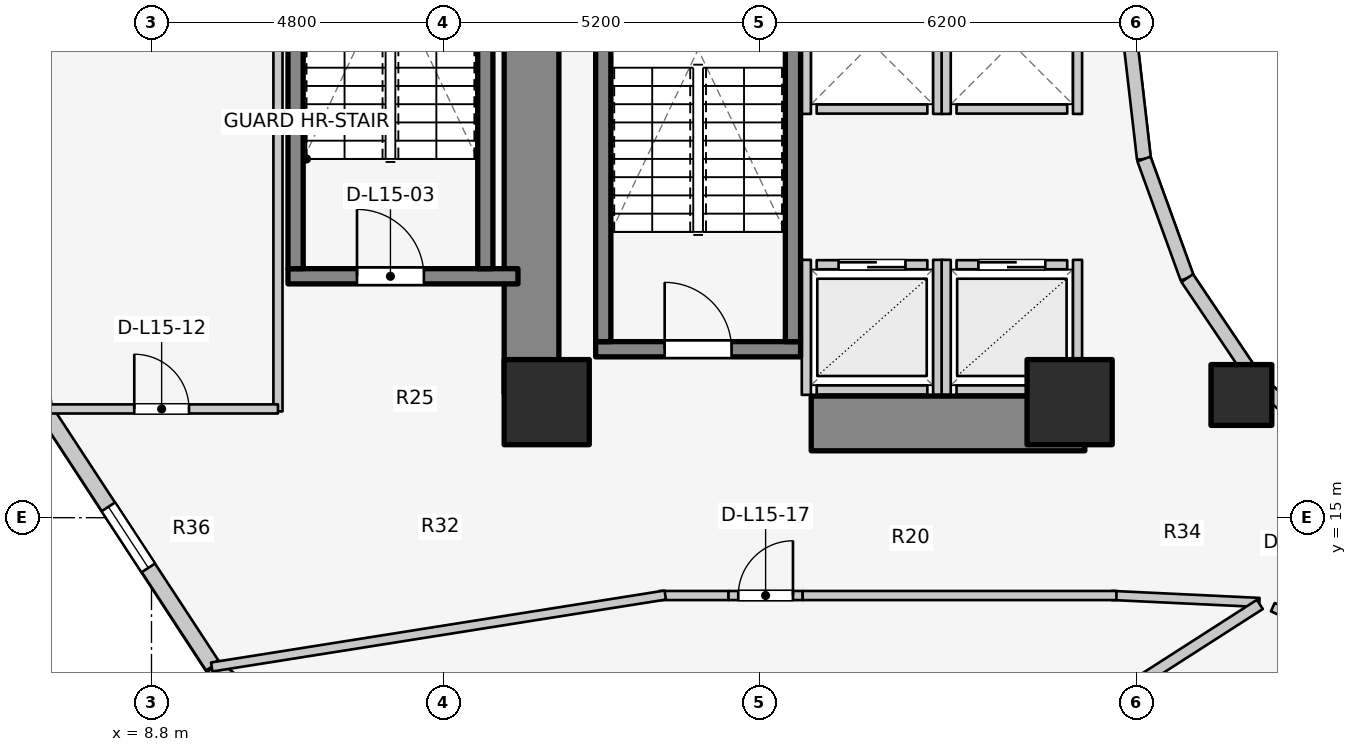
"""IFC4 building model, lengths in metres.
Left out: names, types, materials, properties, quantities, classifications, styles, units other than length and angle.
Written with IfcOpenShell. Run it as: python <this file> out.ifc"""

import sys

from ifc_helpers import new_model, si_unit, direction, frame, frame_2d, origin, origin_2d, place, context, subcontext, project, spatial, rectangle, extrude, element, fill, save


model = new_model("IFC4")
c1 = context("Model", 3, precision=1e-05, world=origin(), true_north=direction((0.0, 1.0)))
c2 = subcontext(c1, "Body", "Model", "MODEL_VIEW")
j1 = project(units=[si_unit("LENGTHUNIT", "METRE"), si_unit("PLANEANGLEUNIT", "RADIAN")], contexts=[c1])
p1 = place(None, origin())
s1 = spatial("IfcSite", under=j1, at=p1, CompositionType="ELEMENT")
p2 = place(p1, origin())
s2 = spatial("IfcBuilding", under=s1, at=p2, CompositionType="ELEMENT")
p3 = place(p2, frame((0.0, 0.0, 52.4)))
s3 = spatial("IfcBuildingStorey", under=s2, at=p3, CompositionType="ELEMENT", Elevation=52.4)
p4 = place(p3, frame((15.05, 17.05, 0.0), z_axis=(0.0, 0.0, 1.0), x_axis=(0.0, 1.0, 0.0)))
e1 = element("IfcWall", 1, at=p4, inside=s3, PredefinedType="SHEAR", context=c2, shape_type="SweptSolid", body=[
    extrude(rectangle(XDim=12.8, YDim=0.9, at=frame_2d((6.4, 0.0))), origin(), (0.0, 0.0, 1.0), 3.1),
])
p5 = place(p3, frame((19.65, 16.55, 0.0), z_axis=(0.0, 0.0, 1.0), x_axis=(1.0, 0.0, 0.0)))
e2 = element("IfcWall", 2, at=p5, inside=s3, PredefinedType="SHEAR", context=c2, shape_type="SweptSolid", body=[
    extrude(rectangle(XDim=4.5, YDim=0.9, at=frame_2d((2.25, 0.0))), origin(), (0.0, 0.0, 1.0), 3.1),
])
p6 = place(p3, frame((16.105, 17.77, 0.0), z_axis=(0.0, 0.0, 1.0), x_axis=(1.0, 0.0, 0.0)))
e3 = element("IfcWall", 3, at=p6, inside=s3, PredefinedType="SOLIDWALL", context=c2, shape_type="SweptSolid", body=[
    extrude(rectangle(XDim=3.37, YDim=0.25, at=frame_2d((1.685, 0.0))), origin(), (0.0, 0.0, 1.0), 3.1),
])
p7 = place(p6, frame((1.135, 0.0, 0.0)))
e4 = element("IfcOpeningElement", 4, at=p7, cuts=e3, PredefinedType="OPENING", context=c2, shape_type="SweptSolid", body=[
    extrude(rectangle(XDim=1.1, YDim=2.1, at=frame_2d((0.55, 1.05))), frame((0.0, 0.135, 0.0), z_axis=(0.0, -1.0, 0.0), x_axis=(1.0, 0.0, 0.0)), (0.0, 0.0, 1.0), 0.27),
])
for number, where, z_axis, x_axis in (
    (5, (16.23, 17.895, 0.0), (0.0, 0.0, 1.0), (0.0, 1.0, 0.0)),
    (6, (19.35, 17.895, 0.0), (0.0, 0.0, 1.0), (0.0, 1.0, 0.0)),
):
    element("IfcWall", number, at=place(p3, frame(where, z_axis=z_axis, x_axis=x_axis)), inside=s3, PredefinedType="SOLIDWALL", context=c2, shape_type="SweptSolid", body=[
        extrude(rectangle(XDim=7.81, YDim=0.25, at=frame_2d((3.905, 0.0))), origin(), (0.0, 0.0, 1.0), 3.1),
    ])
p8 = place(p3, frame((11.045, 18.97, 0.0), z_axis=(0.0, 0.0, 1.0), x_axis=(1.0, 0.0, 0.0)))
e7 = element("IfcWall", 7, at=p8, inside=s3, PredefinedType="SOLIDWALL", context=c2, shape_type="SweptSolid", body=[
    extrude(rectangle(XDim=3.782, YDim=0.25, at=frame_2d((1.891, 0.0))), origin(), (0.0, 0.0, 1.0), 3.1),
])
p9 = place(p8, frame((1.135, 0.0, 0.0)))
e8 = element("IfcOpeningElement", 8, at=p9, cuts=e7, PredefinedType="OPENING", context=c2, shape_type="SweptSolid", body=[
    extrude(rectangle(XDim=1.1, YDim=2.1, at=frame_2d((0.55, 1.05))), frame((0.0, 0.135, 0.0), z_axis=(0.0, -1.0, 0.0), x_axis=(1.0, 0.0, 0.0)), (0.0, 0.0, 1.0), 0.27),
])
for number, where, z_axis, x_axis in (
    (9, (11.17, 19.095, 0.0), (0.0, 0.0, 1.0), (0.0, 1.0, 0.0)),
    (10, (14.29, 19.095, 0.0), (0.0, 0.0, 1.0), (0.0, 1.0, 0.0)),
):
    element("IfcWall", number, at=place(p3, frame(where, z_axis=z_axis, x_axis=x_axis)), inside=s3, PredefinedType="SOLIDWALL", context=c2, shape_type="SweptSolid", body=[
        extrude(rectangle(XDim=7.81, YDim=0.25, at=frame_2d((3.905, 0.0))), origin(), (0.0, 0.0, 1.0), 3.1),
    ])
for number, where, z_axis, x_axis in (
    (11, (15.3, 16.9, 0.0), (0.0, 0.0, 1.0), (1.0, 0.0, 0.0)),
    (12, (23.9, 16.9, 0.0), (0.0, 0.0, 1.0), (1.0, 0.0, 0.0)),
):
    element("IfcColumn", number, at=place(p3, frame(where, z_axis=z_axis, x_axis=x_axis)), inside=s3, PredefinedType="COLUMN", context=c2, shape_type="SweptSolid", body=[
        extrude(rectangle(XDim=1.4, YDim=1.4, at=origin_2d()), origin(), (0.0, 0.0, 1.0), 3.1),
    ])
p10 = place(p3, frame((26.725, 17.018, 0.0), z_axis=(0.0, 0.0, 1.0), x_axis=(1.0, 0.0, 0.0)))
e13 = element("IfcColumn", 13, at=p10, inside=s3, PredefinedType="COLUMN", context=c2, shape_type="SweptSolid", body=[
    extrude(rectangle(XDim=1.0, YDim=1.0, at=origin_2d()), origin(), (0.0, 0.0, 1.0), 3.1),
])
p11 = place(p3, frame((24.88, 23.0, 0.0), z_axis=(0.0, 0.0, 1.0), x_axis=(0.114711713601, -0.993398823617, 0.0)))
e14 = element("IfcWall", 14, at=p11, inside=s3, PredefinedType="STANDARD", context=c2, shape_type="SweptSolid", body=[
    extrude(rectangle(XDim=2.115, YDim=0.23, at=frame_2d((1.058, 0.0))), origin(), (0.0, 0.0, 1.0), 2.56),
])
p12 = place(p3, frame((25.123, 20.898, 0.0), z_axis=(0.0, 0.0, 1.0), x_axis=(0.341423187295, -0.93990968033, 0.0)))
e15 = element("IfcWall", 15, at=p12, inside=s3, PredefinedType="STANDARD", context=c2, shape_type="SweptSolid", body=[
    extrude(rectangle(XDim=2.084, YDim=0.23, at=frame_2d((1.042, 0.0))), origin(), (0.0, 0.0, 1.0), 2.56),
])
p13 = place(p3, frame((25.834, 18.94, 0.0), z_axis=(0.0, 0.0, 1.0), x_axis=(0.558197800898, -0.829707909492, 0.0)))
e16 = element("IfcWall", 16, at=p13, inside=s3, PredefinedType="STANDARD", context=c2, shape_type="SweptSolid", body=[
    extrude(rectangle(XDim=2.027, YDim=0.23, at=frame_2d((1.013, 0.0))), origin(), (0.0, 0.0, 1.0), 1.22),
])
p14 = place(p3, frame((26.965, 17.258, 0.0), z_axis=(0.0, 0.0, 1.0), x_axis=(0.752576694707, -0.658504607869, 0.0)))
e17 = element("IfcWall", 17, at=p14, inside=s3, PredefinedType="STANDARD", context=c2, shape_type="SweptSolid", body=[
    extrude(rectangle(XDim=1.959, YDim=0.23, at=frame_2d((0.98, 0.0))), origin(), (0.0, 0.0, 1.0), 1.22),
])
p15 = place(p3, frame((7.033, 16.795, 0.0), z_axis=(0.0, 0.0, 1.0), x_axis=(0.547702757047, -0.836672988642, 0.0)))
e18 = element("IfcWall", 18, at=p15, inside=s3, PredefinedType="STANDARD", context=c2, shape_type="SweptSolid", body=[
    extrude(rectangle(XDim=5.062, YDim=0.26, at=frame_2d((2.531, 0.0))), origin(), (0.0, 0.0, 1.0), 1.22),
])
p16 = place(p15, frame((1.931, 0.0, 0.15)))
e19 = element("IfcOpeningElement", 19, at=p16, cuts=e18, PredefinedType="OPENING", context=c2, shape_type="SweptSolid", body=[
    extrude(rectangle(XDim=1.2, YDim=0.9, at=frame_2d((0.6, 0.45))), frame((0.0, 0.14, 0.0), z_axis=(0.0, -1.0, 0.0), x_axis=(1.0, 0.0, 0.0)), (0.0, 0.0, 1.0), 0.28),
])
p17 = place(p3, frame((9.806, 12.559, 0.0), z_axis=(0.0, 0.0, 1.0), x_axis=(0.783123133379, -0.621866672179, 0.0)))
e20 = element("IfcWall", 20, at=p17, inside=s3, PredefinedType="STANDARD", context=c2, shape_type="SweptSolid", body=[
    extrude(rectangle(XDim=4.839, YDim=0.26, at=frame_2d((2.419, 0.0))), origin(), (0.0, 0.0, 1.0), 1.22),
])
p18 = place(p17, frame((1.819, 0.0, 0.15)))
e21 = element("IfcOpeningElement", 21, at=p18, cuts=e20, PredefinedType="OPENING", context=c2, shape_type="SweptSolid", body=[
    extrude(rectangle(XDim=1.2, YDim=0.9, at=frame_2d((0.6, 0.45))), frame((0.0, 0.14, 0.0), z_axis=(0.0, -1.0, 0.0), x_axis=(1.0, 0.0, 0.0)), (0.0, 0.0, 1.0), 0.28),
])
p19 = place(p3, frame((19.74, 19.16, 0.0), z_axis=(0.0, 0.0, 1.0), x_axis=(1.0, 0.0, 0.0)))
e22 = element("IfcWall", 22, at=p19, inside=s3, PredefinedType="SOLIDWALL", context=c2, shape_type="SweptSolid", body=[
    extrude(rectangle(XDim=1.82, YDim=0.15, at=frame_2d((0.91, 0.0))), origin(), (0.0, 0.0, 1.0), 2.575),
])
p20 = place(p19, frame((0.36, 0.0, 0.0)))
e23 = element("IfcOpeningElement", 23, at=p20, cuts=e22, PredefinedType="OPENING", context=c2, shape_type="SweptSolid", body=[
    extrude(rectangle(XDim=1.1, YDim=2.1, at=frame_2d((0.55, 1.05))), frame((0.0, 0.085, 0.0), z_axis=(0.0, -1.0, 0.0), x_axis=(1.0, 0.0, 0.0)), (0.0, 0.0, 1.0), 0.17),
])
p21 = place(p3, frame((19.74, 17.1, 0.0), z_axis=(0.0, 0.0, 1.0), x_axis=(1.0, 0.0, 0.0)))
e24 = element("IfcWall", 24, at=p21, inside=s3, PredefinedType="SOLIDWALL", context=c2, shape_type="SweptSolid", body=[
    extrude(rectangle(XDim=1.82, YDim=0.15, at=frame_2d((0.91, 0.0))), origin(), (0.0, 0.0, 1.0), 2.575),
])
p22 = place(p3, frame((19.57, 17.02, 0.0), z_axis=(0.0, 0.0, 1.0), x_axis=(0.0, 1.0, 0.0)))
e25 = element("IfcWall", 25, at=p22, inside=s3, PredefinedType="SOLIDWALL", context=c2, shape_type="SweptSolid", body=[
    extrude(rectangle(XDim=2.22, YDim=0.15, at=frame_2d((1.11, 0.0))), origin(), (0.0, 0.0, 1.0), 2.12),
])
p23 = place(p3, frame((21.73, 17.02, 0.0), z_axis=(0.0, 0.0, 1.0), x_axis=(0.0, 1.0, 0.0)))
e26 = element("IfcWall", 26, at=p23, inside=s3, PredefinedType="SOLIDWALL", context=c2, shape_type="SweptSolid", body=[
    extrude(rectangle(XDim=2.22, YDim=0.15, at=frame_2d((1.11, 0.0))), origin(), (0.0, 0.0, 1.0), 2.575),
])
p24 = place(p3, frame((22.04, 19.16, 0.0), z_axis=(0.0, 0.0, 1.0), x_axis=(1.0, 0.0, 0.0)))
e27 = element("IfcWall", 27, at=p24, inside=s3, PredefinedType="SOLIDWALL", context=c2, shape_type="SweptSolid", body=[
    extrude(rectangle(XDim=1.82, YDim=0.15, at=frame_2d((0.91, 0.0))), origin(), (0.0, 0.0, 1.0), 2.12),
])
p25 = place(p24, frame((0.36, 0.0, 0.0)))
e28 = element("IfcOpeningElement", 28, at=p25, cuts=e27, PredefinedType="OPENING", context=c2, shape_type="SweptSolid", body=[
    extrude(rectangle(XDim=1.1, YDim=2.1, at=frame_2d((0.55, 1.05))), frame((0.0, 0.085, 0.0), z_axis=(0.0, -1.0, 0.0), x_axis=(1.0, 0.0, 0.0)), (0.0, 0.0, 1.0), 0.17),
])
p26 = place(p3, frame((22.04, 17.1, 0.0), z_axis=(0.0, 0.0, 1.0), x_axis=(1.0, 0.0, 0.0)))
e29 = element("IfcWall", 29, at=p26, inside=s3, PredefinedType="SOLIDWALL", context=c2, shape_type="SweptSolid", body=[
    extrude(rectangle(XDim=1.82, YDim=0.15, at=frame_2d((0.91, 0.0))), origin(), (0.0, 0.0, 1.0), 2.12),
])
p27 = place(p3, frame((21.87, 17.02, 0.0), z_axis=(0.0, 0.0, 1.0), x_axis=(0.0, 1.0, 0.0)))
e30 = element("IfcWall", 30, at=p27, inside=s3, PredefinedType="SOLIDWALL", context=c2, shape_type="SweptSolid", body=[
    extrude(rectangle(XDim=2.22, YDim=0.15, at=frame_2d((1.11, 0.0))), origin(), (0.0, 0.0, 1.0), 2.575),
])
p28 = place(p3, frame((24.03, 17.02, 0.0), z_axis=(0.0, 0.0, 1.0), x_axis=(0.0, 1.0, 0.0)))
e31 = element("IfcWall", 31, at=p28, inside=s3, PredefinedType="SOLIDWALL", context=c2, shape_type="SweptSolid", body=[
    extrude(rectangle(XDim=2.22, YDim=0.15, at=frame_2d((1.11, 0.0))), origin(), (0.0, 0.0, 1.0), 1.873),
])
p29 = place(p3, frame((19.74, 21.72, 0.0), z_axis=(0.0, 0.0, 1.0), x_axis=(1.0, 0.0, 0.0)))
e32 = element("IfcWall", 32, at=p29, inside=s3, PredefinedType="SOLIDWALL", context=c2, shape_type="SweptSolid", body=[
    extrude(rectangle(XDim=1.82, YDim=0.15, at=frame_2d((0.91, 0.0))), origin(), (0.0, 0.0, 1.0), 2.575),
])
for number, where, z_axis, x_axis in (
    (33, (19.57, 21.64, 0.0), (0.0, 0.0, 1.0), (0.0, 1.0, 0.0)),
    (34, (21.73, 21.64, 0.0), (0.0, 0.0, 1.0), (0.0, 1.0, 0.0)),
):
    element("IfcWall", number, at=place(p3, frame(where, z_axis=z_axis, x_axis=x_axis)), inside=s3, PredefinedType="SOLIDWALL", context=c2, shape_type="SweptSolid", body=[
        extrude(rectangle(XDim=2.32, YDim=0.15, at=frame_2d((1.16, 0.0))), origin(), (0.0, 0.0, 1.0), 2.575),
    ])
p30 = place(p3, frame((22.04, 21.72, 0.0), z_axis=(0.0, 0.0, 1.0), x_axis=(1.0, 0.0, 0.0)))
e35 = element("IfcWall", 35, at=p30, inside=s3, PredefinedType="SOLIDWALL", context=c2, shape_type="SweptSolid", body=[
    extrude(rectangle(XDim=1.82, YDim=0.15, at=frame_2d((0.91, 0.0))), origin(), (0.0, 0.0, 1.0), 2.12),
])
p31 = place(p3, frame((21.87, 21.64, 0.0), z_axis=(0.0, 0.0, 1.0), x_axis=(0.0, 1.0, 0.0)))
e36 = element("IfcWall", 36, at=p31, inside=s3, PredefinedType="SOLIDWALL", context=c2, shape_type="SweptSolid", body=[
    extrude(rectangle(XDim=2.32, YDim=0.15, at=frame_2d((1.16, 0.0))), origin(), (0.0, 0.0, 1.0), 2.575),
])
p32 = place(p3, frame((24.03, 21.64, 0.0), z_axis=(0.0, 0.0, 1.0), x_axis=(0.0, 1.0, 0.0)))
e37 = element("IfcWall", 37, at=p32, inside=s3, PredefinedType="SOLIDWALL", context=c2, shape_type="SweptSolid", body=[
    extrude(rectangle(XDim=2.32, YDim=0.15, at=frame_2d((1.16, 0.0))), origin(), (0.0, 0.0, 1.0), 2.12),
])
p33 = place(p3, frame((10.88, 16.748, 0.0), z_axis=(0.0, 0.0, 1.0), x_axis=(0.0, 1.0, 0.0)))
e38 = element("IfcWall", 38, at=p33, inside=s3, PredefinedType="PARTITIONING", context=c2, shape_type="SweptSolid", body=[
    extrude(rectangle(XDim=12.503, YDim=0.15, at=frame_2d((6.252, 0.0))), origin(), (0.0, 0.0, 1.0), 2.12),
])
p34 = place(p3, frame((7.014, 16.788, 0.0), z_axis=(0.0, 0.0, 1.0), x_axis=(1.0, 0.0, 0.0)))
e39 = element("IfcWall", 39, at=p34, inside=s3, PredefinedType="PARTITIONING", context=c2, shape_type="SweptSolid", body=[
    extrude(rectangle(XDim=3.866, YDim=0.15, at=frame_2d((1.933, 0.0))), origin(), (0.0, 0.0, 1.0), 2.575),
])
p35 = place(p34, frame((1.503, 0.0, 0.0)))
e40 = element("IfcOpeningElement", 40, at=p35, cuts=e39, PredefinedType="OPENING", context=c2, shape_type="SweptSolid", body=[
    extrude(rectangle(XDim=0.9, YDim=2.1, at=frame_2d((0.45, 1.05))), frame((0.0, 0.085, 0.0), z_axis=(0.0, -1.0, 0.0), x_axis=(1.0, 0.0, 0.0)), (0.0, 0.0, 1.0), 0.17),
])
p36 = place(p3, frame((27.02, 13.606, 0.0), z_axis=(0.0, 0.0, 1.0), x_axis=(-0.998877427952, 0.047369651964, 0.0)))
e41 = element("IfcWall", 41, at=p36, inside=s3, PredefinedType="PARTITIONING", context=c2, shape_type="SweptSolid", body=[
    extrude(rectangle(XDim=2.433, YDim=0.15, at=frame_2d((1.216, 0.0))), origin(), (0.0, 0.0, 1.0), 1.22),
])
p37 = place(p3, frame((17.15, 13.72, 0.0), z_axis=(0.0, 0.0, 1.0), x_axis=(1.0, 0.0, 0.0)))
e42 = element("IfcWall", 42, at=p37, inside=s3, PredefinedType="PARTITIONING", context=c2, shape_type="SweptSolid", body=[
    extrude(rectangle(XDim=1.14, YDim=0.15, at=frame_2d((0.57, 0.0))), origin(), (0.0, 0.0, 1.0), 2.575),
])
p38 = place(p3, frame((18.29, 13.72, 0.0), z_axis=(0.0, 0.0, 1.0), x_axis=(1.0, 0.0, 0.0)))
e43 = element("IfcWall", 43, at=p38, inside=s3, PredefinedType="PARTITIONING", context=c2, shape_type="SweptSolid", body=[
    extrude(rectangle(XDim=1.22, YDim=0.15, at=frame_2d((0.61, 0.0))), origin(), (0.0, 0.0, 1.0), 2.575),
])
p39 = place(p38, frame((0.16, 0.0, 0.0)))
e44 = element("IfcOpeningElement", 44, at=p39, cuts=e43, PredefinedType="OPENING", context=c2, shape_type="SweptSolid", body=[
    extrude(rectangle(XDim=0.9, YDim=2.1, at=frame_2d((0.45, 1.05))), frame((0.0, 0.085, 0.0), z_axis=(0.0, -1.0, 0.0), x_axis=(1.0, 0.0, 0.0)), (0.0, 0.0, 1.0), 0.17),
])
p40 = place(p3, frame((19.51, 13.72, 0.0), z_axis=(0.0, 0.0, 1.0), x_axis=(1.0, 0.0, 0.0)))
e45 = element("IfcWall", 45, at=p40, inside=s3, PredefinedType="PARTITIONING", context=c2, shape_type="SweptSolid", body=[
    extrude(rectangle(XDim=5.16, YDim=0.15, at=frame_2d((2.58, 0.0))), origin(), (0.0, 0.0, 1.0), 1.22),
])
p41 = place(p3, frame((17.25, 13.728, 0.0), z_axis=(0.0, 0.0, 1.0), x_axis=(-0.987655781226, -0.156639898525, 0.0)))
e46 = element("IfcWall", 46, at=p41, inside=s3, PredefinedType="PARTITIONING", context=c2, shape_type="SweptSolid", body=[
    extrude(rectangle(XDim=7.552, YDim=0.15, at=frame_2d((3.776, 0.0))), origin(), (0.0, 0.0, 1.0), 1.22),
])
p42 = place(p3, frame((27.029, 13.574, 0.0), z_axis=(0.0, 0.0, 1.0), x_axis=(-0.841689919529, -0.5399611832, 0.0)))
e47 = element("IfcWall", 47, at=p42, inside=s3, PredefinedType="PARTITIONING", context=c2, shape_type="SweptSolid", body=[
    extrude(rectangle(XDim=10.058, YDim=0.18, at=frame_2d((5.029, 0.0))), origin(), (0.0, 0.0, 1.0), 1.22),
])
p43 = place(p3, frame((29.414, 12.479, 0.0), z_axis=(0.0, 0.0, 1.0), x_axis=(-0.675465011224, -0.737392038615, 0.0)))
e48 = element("IfcWall", 48, at=p43, inside=s3, PredefinedType="PARTITIONING", context=c2, shape_type="SweptSolid", body=[
    extrude(rectangle(XDim=8.007, YDim=0.18, at=frame_2d((4.003, 0.0))), origin(), (0.0, 0.0, 1.0), 1.22),
])
p44 = place(p3, frame((27.241, 13.529, 0.0), z_axis=(0.0, 0.0, 1.0), x_axis=(0.909740090182, -0.415178236804, 0.0)))
e49 = element("IfcWall", 49, at=p44, inside=s3, PredefinedType="PARTITIONING", context=c2, shape_type="SweptSolid", body=[
    extrude(rectangle(XDim=1.27, YDim=0.15, at=frame_2d((0.635, 0.0))), origin(), (0.0, 0.0, 1.0), 2.16),
])
p45 = place(p44, frame((0.16, 0.0, 0.0)))
e50 = element("IfcOpeningElement", 50, at=p45, cuts=e49, PredefinedType="OPENING", context=c2, shape_type="SweptSolid", body=[
    extrude(rectangle(XDim=0.95, YDim=2.1, at=frame_2d((0.475, 1.05))), frame((0.0, 0.085, 0.0), z_axis=(0.0, -1.0, 0.0), x_axis=(1.0, 0.0, 0.0)), (0.0, 0.0, 1.0), 0.17),
])
p46 = place(p16, origin())
e51 = element("IfcWindow", 51, at=p46, inside=s3, PartitioningType="SINGLE_PANEL", PredefinedType="WINDOW", context=c2, shape_type="SweptSolid", body=[
    extrude(rectangle(XDim=1.2, YDim=0.9, at=frame_2d((0.6, 0.45))), frame((0.0, 0.03, 0.0), z_axis=(0.0, -1.0, 0.0), x_axis=(1.0, 0.0, 0.0)), (0.0, 0.0, 1.0), 0.06),
])
fill(e19, e51)
p47 = place(p7, origin())
e52 = element("IfcDoor", 52, at=p47, inside=s3, OperationType="SINGLE_SWING_LEFT", PredefinedType="DOOR", context=c2, shape_type="SweptSolid", body=[
    extrude(rectangle(XDim=1.1, YDim=2.1, at=frame_2d((0.55, 1.05))), frame((0.0, 0.025, 0.0), z_axis=(0.0, -1.0, 0.0), x_axis=(1.0, 0.0, 0.0)), (0.0, 0.0, 1.0), 0.05),
])
fill(e4, e52)
p48 = place(p9, origin())
e53 = element("IfcDoor", 53, at=p48, inside=s3, OperationType="SINGLE_SWING_LEFT", PredefinedType="DOOR", context=c2, shape_type="SweptSolid", body=[
    extrude(rectangle(XDim=1.1, YDim=2.1, at=frame_2d((0.55, 1.05))), frame((0.0, 0.025, 0.0), z_axis=(0.0, -1.0, 0.0), x_axis=(1.0, 0.0, 0.0)), (0.0, 0.0, 1.0), 0.05),
])
fill(e8, e53)
p49 = place(p20, origin())
e54 = element("IfcDoor", 54, at=p49, inside=s3, OperationType="DOUBLE_DOOR_SLIDING", PredefinedType="DOOR", context=c2, shape_type="SweptSolid", body=[
    extrude(rectangle(XDim=1.1, YDim=2.1, at=frame_2d((0.55, 1.05))), frame((0.0, 0.025, 0.0), z_axis=(0.0, -1.0, 0.0), x_axis=(1.0, 0.0, 0.0)), (0.0, 0.0, 1.0), 0.05),
])
fill(e23, e54)
p50 = place(p25, origin())
e55 = element("IfcDoor", 55, at=p50, inside=s3, OperationType="DOUBLE_DOOR_SLIDING", PredefinedType="DOOR", context=c2, shape_type="SweptSolid", body=[
    extrude(rectangle(XDim=1.1, YDim=2.1, at=frame_2d((0.55, 1.05))), frame((0.0, 0.025, 0.0), z_axis=(0.0, -1.0, 0.0), x_axis=(1.0, 0.0, 0.0)), (0.0, 0.0, 1.0), 0.05),
])
fill(e28, e55)
p51 = place(p35, origin())
e56 = element("IfcDoor", 56, at=p51, inside=s3, OperationType="SINGLE_SWING_LEFT", PredefinedType="DOOR", context=c2, shape_type="SweptSolid", body=[
    extrude(rectangle(XDim=0.9, YDim=2.1, at=frame_2d((0.45, 1.05))), frame((0.0, 0.025, 0.0), z_axis=(0.0, -1.0, 0.0), x_axis=(1.0, 0.0, 0.0)), (0.0, 0.0, 1.0), 0.05),
])
fill(e40, e56)
p52 = place(p39, origin())
e57 = element("IfcDoor", 57, at=p52, inside=s3, OperationType="SINGLE_SWING_RIGHT", PredefinedType="DOOR", context=c2, shape_type="SweptSolid", body=[
    extrude(rectangle(XDim=0.9, YDim=2.1, at=frame_2d((0.45, 1.05))), frame((0.0, 0.025, 0.0), z_axis=(0.0, -1.0, 0.0), x_axis=(1.0, 0.0, 0.0)), (0.0, 0.0, 1.0), 0.05),
])
fill(e44, e57)
save(model, sys.argv[1])
